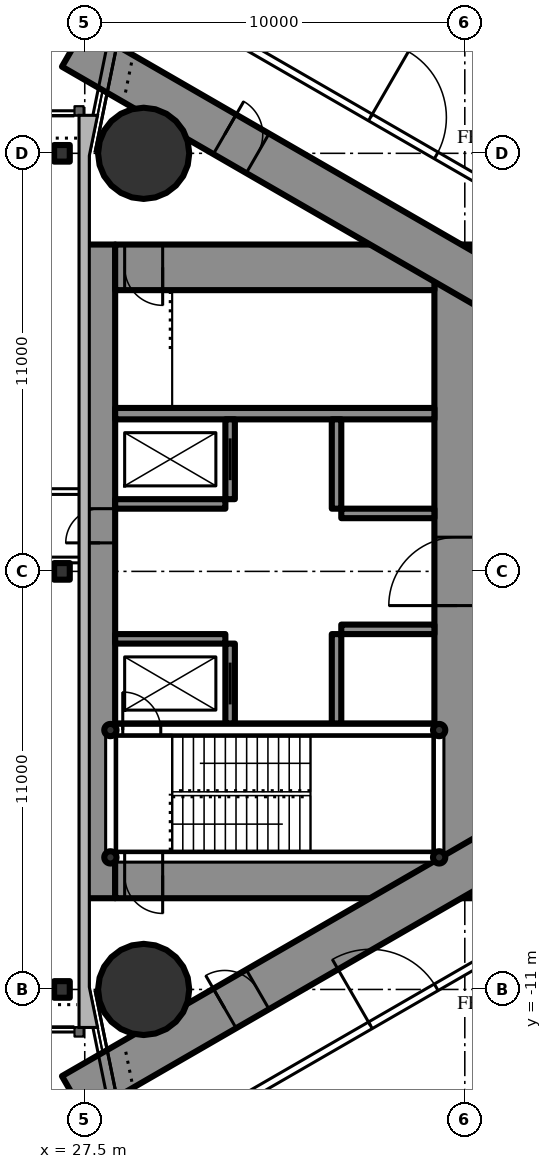
"""IFC4 building model, lengths in metres.
Left out: names, types, materials, properties, quantities, classifications, styles, units other than length and angle.
Written with IfcOpenShell. Run it as: python <this file> out.ifc"""

import sys

from ifc_helpers import new_model, si_unit, direction, frame, frame_2d, origin, origin_2d, place, context, subcontext, project, spatial, rectangle, circle, hollow_circle, i_section, extrude, element, fill, save


model = new_model("IFC4")
c1 = context("Model", 3, precision=1e-05, world=origin(), true_north=direction((0.0, 1.0)))
c2 = subcontext(c1, "Body", "Model", "MODEL_VIEW")
j1 = project(units=[si_unit("LENGTHUNIT", "METRE"), si_unit("PLANEANGLEUNIT", "RADIAN")], contexts=[c1])
p1 = place(None, origin())
s1 = spatial("IfcSite", under=j1, at=p1, CompositionType="ELEMENT")
p2 = place(p1, origin())
s2 = spatial("IfcBuilding", under=s1, at=p2, CompositionType="ELEMENT")
p3 = place(p2, frame((0.0, 0.0, 268.3)))
s3 = spatial("IfcBuildingStorey", under=s2, at=p3, CompositionType="ELEMENT", Elevation=268.3)
for number, where, z_axis, x_axis in (
    (1, (29.05, 11.0, 0.0), (0.0, 0.0, 1.0), (1.0, 0.0, 0.0)),
    (2, (29.05, -11.0, 0.0), (0.0, 0.0, 1.0), (1.0, 0.0, 0.0)),
):
    element("IfcColumn", number, at=place(p3, frame(where, z_axis=z_axis, x_axis=x_axis)), inside=s3, PredefinedType="COLUMN", context=c2, shape_type="SweptSolid", body=[
        extrude(circle(Radius=1.2, at=origin_2d()), origin(), (0.0, 0.0, 1.0), 5.0),
    ])
p4 = place(p3, frame((27.9, -8.6, 0.0), z_axis=(0.0, 0.0, 1.0), x_axis=(0.0, 1.0, 0.0)))
e3 = element("IfcWall", 3, at=p4, inside=s3, PredefinedType="SHEAR", context=c2, shape_type="SweptSolid", body=[
    extrude(rectangle(XDim=17.2, YDim=0.8, at=frame_2d((8.6, 0.0))), origin(), (0.0, 0.0, 1.0), 5.0),
])
p5 = place(p4, frame((9.35, 0.0, 0.0)))
e4 = element("IfcOpeningElement", 4, at=p5, cuts=e3, PredefinedType="OPENING", context=c2, shape_type="SweptSolid", body=[
    extrude(rectangle(XDim=0.9, YDim=2.2, at=frame_2d((0.45, 1.1))), frame((0.0, 0.41, 0.0), z_axis=(0.0, -1.0, 0.0), x_axis=(1.0, 0.0, 0.0)), (0.0, 0.0, 1.0), 0.82),
])
p6 = place(p3, frame((37.3, -8.6, 0.0), z_axis=(0.0, 0.0, 1.0), x_axis=(0.0, 1.0, 0.0)))
e5 = element("IfcWall", 5, at=p6, inside=s3, PredefinedType="SHEAR", context=c2, shape_type="SweptSolid", body=[
    extrude(rectangle(XDim=17.2, YDim=1.2, at=frame_2d((8.6, 0.0))), origin(), (0.0, 0.0, 1.0), 5.0),
])
p7 = place(p6, frame((7.7, 0.0, 0.0)))
e6 = element("IfcOpeningElement", 6, at=p7, cuts=e5, PredefinedType="OPENING", context=c2, shape_type="SweptSolid", body=[
    extrude(rectangle(XDim=1.8, YDim=2.2, at=frame_2d((0.9, 1.1))), frame((0.0, 0.61, 0.0), z_axis=(0.0, -1.0, 0.0), x_axis=(1.0, 0.0, 0.0)), (0.0, 0.0, 1.0), 1.22),
])
p8 = place(p3, frame((28.3, -8.0, 0.0), z_axis=(0.0, 0.0, 1.0), x_axis=(1.0, 0.0, 0.0)))
e7 = element("IfcWall", 7, at=p8, inside=s3, PredefinedType="SHEAR", context=c2, shape_type="SweptSolid", body=[
    extrude(rectangle(XDim=8.4, YDim=1.2, at=frame_2d((4.2, 0.0))), origin(), (0.0, 0.0, 1.0), 5.0),
])
p9 = place(p8, frame((0.25, 0.0, 0.0)))
e8 = element("IfcOpeningElement", 8, at=p9, cuts=e7, PredefinedType="OPENING", context=c2, shape_type="SweptSolid", body=[
    extrude(rectangle(XDim=1.0, YDim=2.2, at=frame_2d((0.5, 1.1))), frame((0.0, 0.61, 0.0), z_axis=(0.0, -1.0, 0.0), x_axis=(1.0, 0.0, 0.0)), (0.0, 0.0, 1.0), 1.22),
])
p10 = place(p3, frame((28.3, 8.0, 0.0), z_axis=(0.0, 0.0, 1.0), x_axis=(1.0, 0.0, 0.0)))
e9 = element("IfcWall", 9, at=p10, inside=s3, PredefinedType="SHEAR", context=c2, shape_type="SweptSolid", body=[
    extrude(rectangle(XDim=8.4, YDim=1.2, at=frame_2d((4.2, 0.0))), origin(), (0.0, 0.0, 1.0), 5.0),
])
p11 = place(p10, frame((0.25, 0.0, 0.0)))
e10 = element("IfcOpeningElement", 10, at=p11, cuts=e9, PredefinedType="OPENING", context=c2, shape_type="SweptSolid", body=[
    extrude(rectangle(XDim=1.0, YDim=2.2, at=frame_2d((0.5, 1.1))), frame((0.0, 0.61, 0.0), z_axis=(0.0, -1.0, 0.0), x_axis=(1.0, 0.0, 0.0)), (0.0, 0.0, 1.0), 1.22),
])
for number, where, z_axis, x_axis in (
    (11, (28.3, -4.15, 0.0), (0.0, 0.0, 1.0), (1.0, 0.0, 0.0)),
    (12, (28.3, 4.15, 0.0), (0.0, 0.0, 1.0), (1.0, 0.0, 0.0)),
):
    element("IfcWall", number, at=place(p3, frame(where, z_axis=z_axis, x_axis=x_axis)), inside=s3, PredefinedType="SHEAR", context=c2, shape_type="SweptSolid", body=[
        extrude(rectangle(XDim=8.4, YDim=0.3, at=frame_2d((4.2, 0.0))), origin(), (0.0, 0.0, 1.0), 5.0),
    ])
p12 = place(p3, frame((31.325, -4.0, 0.0), z_axis=(0.0, 0.0, 1.0), x_axis=(0.0, 1.0, 0.0)))
e13 = element("IfcWall", 13, at=p12, inside=s3, PredefinedType="SHEAR", context=c2, shape_type="SweptSolid", body=[
    extrude(rectangle(XDim=2.1, YDim=0.25, at=frame_2d((1.05, 0.0))), origin(), (0.0, 0.0, 1.0), 5.0),
])
p13 = place(p12, frame((0.5, 0.0, 0.0)))
e14 = element("IfcOpeningElement", 14, at=p13, cuts=e13, PredefinedType="OPENING", context=c2, shape_type="SweptSolid", body=[
    extrude(rectangle(XDim=1.1, YDim=2.2, at=frame_2d((0.55, 1.1))), frame((0.0, 0.135, 0.0), z_axis=(0.0, -1.0, 0.0), x_axis=(1.0, 0.0, 0.0)), (0.0, 0.0, 1.0), 0.27),
])
p14 = place(p3, frame((34.125, -4.0, 0.0), z_axis=(0.0, 0.0, 1.0), x_axis=(0.0, 1.0, 0.0)))
e15 = element("IfcWall", 15, at=p14, inside=s3, PredefinedType="SHEAR", context=c2, shape_type="SweptSolid", body=[
    extrude(rectangle(XDim=2.35, YDim=0.25, at=frame_2d((1.175, 0.0))), origin(), (0.0, 0.0, 1.0), 5.0),
])
p15 = place(p3, frame((28.3, -1.775, 0.0), z_axis=(0.0, 0.0, 1.0), x_axis=(1.0, 0.0, 0.0)))
e16 = element("IfcWall", 16, at=p15, inside=s3, PredefinedType="SHEAR", context=c2, shape_type="SweptSolid", body=[
    extrude(rectangle(XDim=2.9, YDim=0.25, at=frame_2d((1.45, 0.0))), origin(), (0.0, 0.0, 1.0), 5.0),
])
p16 = place(p3, frame((34.25, -1.525, 0.0), z_axis=(0.0, 0.0, 1.0), x_axis=(1.0, 0.0, 0.0)))
e17 = element("IfcWall", 17, at=p16, inside=s3, PredefinedType="SHEAR", context=c2, shape_type="SweptSolid", body=[
    extrude(rectangle(XDim=2.45, YDim=0.25, at=frame_2d((1.225, 0.0))), origin(), (0.0, 0.0, 1.0), 5.0),
])
p17 = place(p3, frame((31.325, 1.9, 0.0), z_axis=(0.0, 0.0, 1.0), x_axis=(0.0, 1.0, 0.0)))
e18 = element("IfcWall", 18, at=p17, inside=s3, PredefinedType="SHEAR", context=c2, shape_type="SweptSolid", body=[
    extrude(rectangle(XDim=2.1, YDim=0.25, at=frame_2d((1.05, 0.0))), origin(), (0.0, 0.0, 1.0), 5.0),
])
p18 = place(p17, frame((0.5, 0.0, 0.0)))
e19 = element("IfcOpeningElement", 19, at=p18, cuts=e18, PredefinedType="OPENING", context=c2, shape_type="SweptSolid", body=[
    extrude(rectangle(XDim=1.1, YDim=2.2, at=frame_2d((0.55, 1.1))), frame((0.0, 0.135, 0.0), z_axis=(0.0, -1.0, 0.0), x_axis=(1.0, 0.0, 0.0)), (0.0, 0.0, 1.0), 0.27),
])
p19 = place(p3, frame((34.125, 1.65, 0.0), z_axis=(0.0, 0.0, 1.0), x_axis=(0.0, 1.0, 0.0)))
e20 = element("IfcWall", 20, at=p19, inside=s3, PredefinedType="SHEAR", context=c2, shape_type="SweptSolid", body=[
    extrude(rectangle(XDim=2.35, YDim=0.25, at=frame_2d((1.175, 0.0))), origin(), (0.0, 0.0, 1.0), 5.0),
])
p20 = place(p3, frame((28.3, 1.775, 0.0), z_axis=(0.0, 0.0, 1.0), x_axis=(1.0, 0.0, 0.0)))
e21 = element("IfcWall", 21, at=p20, inside=s3, PredefinedType="SHEAR", context=c2, shape_type="SweptSolid", body=[
    extrude(rectangle(XDim=2.9, YDim=0.25, at=frame_2d((1.45, 0.0))), origin(), (0.0, 0.0, 1.0), 5.0),
])
p21 = place(p3, frame((34.25, 1.525, 0.0), z_axis=(0.0, 0.0, 1.0), x_axis=(1.0, 0.0, 0.0)))
e22 = element("IfcWall", 22, at=p21, inside=s3, PredefinedType="SHEAR", context=c2, shape_type="SweptSolid", body=[
    extrude(rectangle(XDim=2.45, YDim=0.25, at=frame_2d((1.225, 0.0))), origin(), (0.0, 0.0, 1.0), 5.0),
])
p22 = place(p3, frame((27.2, -13.8, 0.0), z_axis=(0.0, 0.0, 1.0), x_axis=(0.866027159892, 0.499996958321, 0.0)))
e23 = element("IfcWall", 23, at=p22, inside=s3, PredefinedType="SHEAR", context=c2, shape_type="SweptSolid", body=[
    extrude(rectangle(XDim=27.947, YDim=1.2, at=frame_2d((13.973, 0.0))), origin(), (0.0, 0.0, 1.0), 5.0),
])
p23 = place(p22, frame((4.6, 0.0, 0.0)))
e24 = element("IfcOpeningElement", 24, at=p23, cuts=e23, PredefinedType="OPENING", context=c2, shape_type="SweptSolid", body=[
    extrude(rectangle(XDim=1.0, YDim=2.2, at=frame_2d((0.5, 1.1))), frame((0.0, 0.61, 0.0), z_axis=(0.0, -1.0, 0.0), x_axis=(1.0, 0.0, 0.0)), (0.0, 0.0, 1.0), 1.22),
])
p24 = place(p22, frame((13.395, 0.0, 0.0)))
e25 = element("IfcOpeningElement", 25, at=p24, cuts=e23, PredefinedType="OPENING", context=c2, shape_type="SweptSolid", body=[
    extrude(rectangle(XDim=1.8, YDim=2.2, at=frame_2d((0.9, 1.1))), frame((0.0, 0.61, 0.0), z_axis=(0.0, -1.0, 0.0), x_axis=(1.0, 0.0, 0.0)), (0.0, 0.0, 1.0), 1.22),
])
p25 = place(p3, frame((27.2, 13.8, 0.0), z_axis=(0.0, 0.0, 1.0), x_axis=(0.866024515034, -0.500001539357, 0.0)))
e26 = element("IfcWall", 26, at=p25, inside=s3, PredefinedType="SHEAR", context=c2, shape_type="SweptSolid", body=[
    extrude(rectangle(XDim=26.907, YDim=1.2, at=frame_2d((13.454, 0.0))), origin(), (0.0, 0.0, 1.0), 5.0),
])
p26 = place(p25, frame((4.6, 0.0, 0.0)))
e27 = element("IfcOpeningElement", 27, at=p26, cuts=e26, PredefinedType="OPENING", context=c2, shape_type="SweptSolid", body=[
    extrude(rectangle(XDim=1.0, YDim=2.2, at=frame_2d((0.5, 1.1))), frame((0.0, 0.61, 0.0), z_axis=(0.0, -1.0, 0.0), x_axis=(1.0, 0.0, 0.0)), (0.0, 0.0, 1.0), 1.22),
])
p27 = place(p25, frame((13.395, 0.0, 0.0)))
e28 = element("IfcOpeningElement", 28, at=p27, cuts=e26, PredefinedType="OPENING", context=c2, shape_type="SweptSolid", body=[
    extrude(rectangle(XDim=1.8, YDim=2.2, at=frame_2d((0.9, 1.1))), frame((0.0, 0.61, 0.0), z_axis=(0.0, -1.0, 0.0), x_axis=(1.0, 0.0, 0.0)), (0.0, 0.0, 1.0), 1.22),
])
for number, where, z_axis, x_axis in (
    (29, (26.9, -11.0, 0.0), (0.0, 0.0, 1.0), (1.0, 0.0, 0.0)),
    (30, (26.9, 0.0, 0.0), (0.0, 0.0, 1.0), (1.0, 0.0, 0.0)),
    (31, (26.9, 11.0, 0.0), (0.0, 0.0, 1.0), (1.0, 0.0, 0.0)),
):
    element("IfcColumn", number, at=place(p3, frame(where, z_axis=z_axis, x_axis=x_axis)), inside=s3, PredefinedType="COLUMN", context=c2, shape_type="SweptSolid", body=[
        extrude(i_section(OverallWidth=0.412, OverallDepth=0.437, WebThickness=0.036, FlangeThickness=0.058, FilletRadius=0.015, at=origin_2d()), origin(), (0.0, 0.0, 1.0), 5.0),
    ])
for number, where, z_axis, x_axis in (
    (32, (28.175, -7.525, 5.0), (0.0, 0.0, 1.0), (1.0, 0.0, 0.0)),
    (33, (36.825, -7.525, 5.0), (0.0, 0.0, 1.0), (1.0, 0.0, 0.0)),
    (34, (28.175, -4.175, 5.0), (0.0, 0.0, 1.0), (1.0, 0.0, 0.0)),
    (35, (36.825, -4.175, 5.0), (0.0, 0.0, 1.0), (1.0, 0.0, 0.0)),
):
    element("IfcColumn", number, at=place(p3, frame(where, z_axis=z_axis, x_axis=x_axis)), inside=s3, PredefinedType="COLUMN", context=c2, shape_type="SweptSolid", body=[
        extrude(hollow_circle(Radius=0.162, WallThickness=0.012, at=origin_2d()), origin(), (0.0, 0.0, 1.0), 3.0),
    ])
for number, where, z_axis, x_axis in (
    (36, (28.175, -7.422, 5.0), (0.0, 0.0, 1.0), (0.0, 1.0, 0.0)),
    (37, (36.825, -7.422, 5.0), (0.0, 0.0, 1.0), (0.0, 1.0, 0.0)),
):
    element("IfcWall", number, at=place(p3, frame(where, z_axis=z_axis, x_axis=x_axis)), inside=s3, PredefinedType="SOLIDWALL", context=c2, shape_type="SweptSolid", body=[
        extrude(rectangle(XDim=3.144, YDim=0.25, at=frame_2d((1.572, 0.0))), origin(), (0.0, 0.0, 1.0), 2.54),
    ])
p28 = place(p3, frame((28.278, -7.525, 5.0), z_axis=(0.0, 0.0, 1.0), x_axis=(1.0, 0.0, 0.0)))
e38 = element("IfcWall", 38, at=p28, inside=s3, PredefinedType="SOLIDWALL", context=c2, shape_type="SweptSolid", body=[
    extrude(rectangle(XDim=8.444, YDim=0.25, at=frame_2d((4.222, 0.0))), origin(), (0.0, 0.0, 1.0), 2.54),
])
p29 = place(p3, frame((28.278, -4.175, 5.0), z_axis=(0.0, 0.0, 1.0), x_axis=(1.0, 0.0, 0.0)))
e39 = element("IfcWall", 39, at=p29, inside=s3, PredefinedType="SOLIDWALL", context=c2, shape_type="SweptSolid", body=[
    extrude(rectangle(XDim=8.444, YDim=0.25, at=frame_2d((4.222, 0.0))), origin(), (0.0, 0.0, 1.0), 2.54),
])
p30 = place(p29, frame((0.222, 0.0, 0.0)))
e40 = element("IfcOpeningElement", 40, at=p30, cuts=e39, PredefinedType="OPENING", context=c2, shape_type="SweptSolid", body=[
    extrude(rectangle(XDim=1.0, YDim=2.2, at=frame_2d((0.5, 1.1))), frame((0.0, 0.135, 0.0), z_axis=(0.0, -1.0, 0.0), x_axis=(1.0, 0.0, 0.0)), (0.0, 0.0, 1.0), 0.27),
])
p31 = place(p3, frame((28.959, -15.44, 0.0), z_axis=(0.0, 0.0, 1.0), x_axis=(0.866025227435, 0.500000305447, 0.0)))
e41 = element("IfcWall", 41, at=p31, inside=s3, PredefinedType="PARTITIONING", context=c2, shape_type="SweptSolid", body=[
    extrude(rectangle(XDim=30.88, YDim=0.2, at=frame_2d((15.44, 0.0))), origin(), (0.0, 0.0, 1.0), 4.7),
])
p32 = place(p31, frame((6.994, 0.0, 0.0)))
e42 = element("IfcOpeningElement", 42, at=p32, cuts=e41, PredefinedType="OPENING", context=c2, shape_type="SweptSolid", body=[
    extrude(rectangle(XDim=2.0, YDim=2.4, at=frame_2d((1.0, 1.2))), frame((0.0, 0.11, 0.0), z_axis=(0.0, -1.0, 0.0), x_axis=(1.0, 0.0, 0.0)), (0.0, 0.0, 1.0), 0.22),
])
p33 = place(p31, frame((16.704, 0.0, 0.0)))
e43 = element("IfcOpeningElement", 43, at=p33, cuts=e41, PredefinedType="OPENING", context=c2, shape_type="SweptSolid", body=[
    extrude(rectangle(XDim=2.0, YDim=2.4, at=frame_2d((1.0, 1.2))), frame((0.0, 0.11, 0.0), z_axis=(0.0, -1.0, 0.0), x_axis=(1.0, 0.0, 0.0)), (0.0, 0.0, 1.0), 0.22),
])
p34 = place(p31, frame((20.587, 0.0, 0.0)))
e44 = element("IfcOpeningElement", 44, at=p34, cuts=e41, PredefinedType="OPENING", context=c2, shape_type="SweptSolid", body=[
    extrude(rectangle(XDim=2.0, YDim=2.4, at=frame_2d((1.0, 1.2))), frame((0.0, 0.11, 0.0), z_axis=(0.0, -1.0, 0.0), x_axis=(1.0, 0.0, 0.0)), (0.0, 0.0, 1.0), 0.22),
])
p35 = place(p31, frame((26.092, 0.0, 0.0)))
e45 = element("IfcOpeningElement", 45, at=p35, cuts=e41, PredefinedType="OPENING", context=c2, shape_type="SweptSolid", body=[
    extrude(rectangle(XDim=2.0, YDim=2.4, at=frame_2d((1.0, 1.2))), frame((0.0, 0.11, 0.0), z_axis=(0.0, -1.0, 0.0), x_axis=(1.0, 0.0, 0.0)), (0.0, 0.0, 1.0), 0.22),
])
p36 = place(p3, frame((28.959, 15.44, 0.0), z_axis=(0.0, 0.0, 1.0), x_axis=(0.866027378611, -0.499996579484, 0.0)))
e46 = element("IfcWall", 46, at=p36, inside=s3, PredefinedType="PARTITIONING", context=c2, shape_type="SweptSolid", body=[
    extrude(rectangle(XDim=30.76, YDim=0.2, at=frame_2d((15.38, 0.0))), origin(), (0.0, 0.0, 1.0), 4.7),
])
p37 = place(p36, frame((26.032, 0.0, 0.0)))
e47 = element("IfcOpeningElement", 47, at=p37, cuts=e46, PredefinedType="OPENING", context=c2, shape_type="SweptSolid", body=[
    extrude(rectangle(XDim=2.0, YDim=2.4, at=frame_2d((1.0, 1.2))), frame((0.0, 0.11, 0.0), z_axis=(0.0, -1.0, 0.0), x_axis=(1.0, 0.0, 0.0)), (0.0, 0.0, 1.0), 0.22),
])
p38 = place(p36, frame((20.587, 0.0, 0.0)))
e48 = element("IfcOpeningElement", 48, at=p38, cuts=e46, PredefinedType="OPENING", context=c2, shape_type="SweptSolid", body=[
    extrude(rectangle(XDim=2.0, YDim=2.4, at=frame_2d((1.0, 1.2))), frame((0.0, 0.11, 0.0), z_axis=(0.0, -1.0, 0.0), x_axis=(1.0, 0.0, 0.0)), (0.0, 0.0, 1.0), 0.22),
])
p39 = place(p36, frame((16.704, 0.0, 0.0)))
e49 = element("IfcOpeningElement", 49, at=p39, cuts=e46, PredefinedType="OPENING", context=c2, shape_type="SweptSolid", body=[
    extrude(rectangle(XDim=2.0, YDim=2.4, at=frame_2d((1.0, 1.2))), frame((0.0, 0.11, 0.0), z_axis=(0.0, -1.0, 0.0), x_axis=(1.0, 0.0, 0.0)), (0.0, 0.0, 1.0), 0.22),
])
p40 = place(p36, frame((6.994, 0.0, 0.0)))
e50 = element("IfcOpeningElement", 50, at=p40, cuts=e46, PredefinedType="OPENING", context=c2, shape_type="SweptSolid", body=[
    extrude(rectangle(XDim=2.0, YDim=2.4, at=frame_2d((1.0, 1.2))), frame((0.0, 0.11, 0.0), z_axis=(0.0, -1.0, 0.0), x_axis=(1.0, 0.0, 0.0)), (0.0, 0.0, 1.0), 0.22),
])
p41 = place(p3, frame((-27.5, 0.3, 0.0), z_axis=(0.0, 0.0, 1.0), x_axis=(1.0, 0.0, 0.0)))
e51 = element("IfcWall", 51, at=p41, inside=s3, PredefinedType="PARTITIONING", context=c2, shape_type="SweptSolid", body=[
    extrude(rectangle(XDim=55.0, YDim=0.15, at=frame_2d((27.5, 0.0))), origin(), (0.0, 0.0, 1.0), 4.163),
])
p42 = place(p41, frame((7.25, 0.0, 0.0)))
e52 = element("IfcOpeningElement", 52, at=p42, cuts=e51, PredefinedType="OPENING", context=c2, shape_type="SweptSolid", body=[
    extrude(rectangle(XDim=2.0, YDim=2.4, at=frame_2d((1.0, 1.2))), frame((0.0, 0.085, 0.0), z_axis=(0.0, -1.0, 0.0), x_axis=(1.0, 0.0, 0.0)), (0.0, 0.0, 1.0), 0.17),
])
p43 = place(p41, frame((29.25, 0.0, 0.0)))
e53 = element("IfcOpeningElement", 53, at=p43, cuts=e51, PredefinedType="OPENING", context=c2, shape_type="SweptSolid", body=[
    extrude(rectangle(XDim=2.0, YDim=2.4, at=frame_2d((1.0, 1.2))), frame((0.0, 0.085, 0.0), z_axis=(0.0, -1.0, 0.0), x_axis=(1.0, 0.0, 0.0)), (0.0, 0.0, 1.0), 0.17),
])
p44 = place(p41, frame((45.75, 0.0, 0.0)))
e54 = element("IfcOpeningElement", 54, at=p44, cuts=e51, PredefinedType="OPENING", context=c2, shape_type="SweptSolid", body=[
    extrude(rectangle(XDim=2.0, YDim=2.4, at=frame_2d((1.0, 1.2))), frame((0.0, 0.085, 0.0), z_axis=(0.0, -1.0, 0.0), x_axis=(1.0, 0.0, 0.0)), (0.0, 0.0, 1.0), 0.17),
])
p45 = place(p3, frame((-27.5, 2.1, 0.0), z_axis=(0.0, 0.0, 1.0), x_axis=(1.0, 0.0, 0.0)))
e55 = element("IfcWall", 55, at=p45, inside=s3, PredefinedType="PARTITIONING", context=c2, shape_type="SweptSolid", body=[
    extrude(rectangle(XDim=55.0, YDim=0.15, at=frame_2d((27.5, 0.0))), origin(), (0.0, 0.0, 1.0), 4.7),
])
p46 = place(p45, frame((7.25, 0.0, 0.0)))
e56 = element("IfcOpeningElement", 56, at=p46, cuts=e55, PredefinedType="OPENING", context=c2, shape_type="SweptSolid", body=[
    extrude(rectangle(XDim=2.0, YDim=2.4, at=frame_2d((1.0, 1.2))), frame((0.0, 0.085, 0.0), z_axis=(0.0, -1.0, 0.0), x_axis=(1.0, 0.0, 0.0)), (0.0, 0.0, 1.0), 0.17),
])
p47 = place(p45, frame((29.25, 0.0, 0.0)))
e57 = element("IfcOpeningElement", 57, at=p47, cuts=e55, PredefinedType="OPENING", context=c2, shape_type="SweptSolid", body=[
    extrude(rectangle(XDim=2.0, YDim=2.4, at=frame_2d((1.0, 1.2))), frame((0.0, 0.085, 0.0), z_axis=(0.0, -1.0, 0.0), x_axis=(1.0, 0.0, 0.0)), (0.0, 0.0, 1.0), 0.17),
])
p48 = place(p45, frame((45.75, 0.0, 0.0)))
e58 = element("IfcOpeningElement", 58, at=p48, cuts=e55, PredefinedType="OPENING", context=c2, shape_type="SweptSolid", body=[
    extrude(rectangle(XDim=2.0, YDim=2.4, at=frame_2d((1.0, 1.2))), frame((0.0, 0.085, 0.0), z_axis=(0.0, -1.0, 0.0), x_axis=(1.0, 0.0, 0.0)), (0.0, 0.0, 1.0), 0.17),
])
p49 = place(p30, origin())
e59 = element("IfcDoor", 59, at=p49, inside=s3, OperationType="SINGLE_SWING_LEFT", PredefinedType="DOOR", context=c2, shape_type="SweptSolid", body=[
    extrude(rectangle(XDim=1.0, YDim=2.2, at=frame_2d((0.5, 1.1))), frame((0.0, 0.025, 0.0), z_axis=(0.0, -1.0, 0.0), x_axis=(1.0, 0.0, 0.0)), (0.0, 0.0, 1.0), 0.05),
])
fill(e40, e59)
p50 = place(p32, origin())
e60 = element("IfcDoor", 60, at=p50, inside=s3, OperationType="DOUBLE_DOOR_SINGLE_SWING", PredefinedType="DOOR", context=c2, shape_type="SweptSolid", body=[
    extrude(rectangle(XDim=2.0, YDim=2.4, at=frame_2d((1.0, 1.2))), frame((0.0, 0.025, 0.0), z_axis=(0.0, -1.0, 0.0), x_axis=(1.0, 0.0, 0.0)), (0.0, 0.0, 1.0), 0.05),
])
fill(e42, e60)
p51 = place(p40, origin())
e61 = element("IfcDoor", 61, at=p51, inside=s3, OperationType="DOUBLE_DOOR_SINGLE_SWING", PredefinedType="DOOR", context=c2, shape_type="SweptSolid", body=[
    extrude(rectangle(XDim=2.0, YDim=2.4, at=frame_2d((1.0, 1.2))), frame((0.0, 0.025, 0.0), z_axis=(0.0, -1.0, 0.0), x_axis=(1.0, 0.0, 0.0)), (0.0, 0.0, 1.0), 0.05),
])
fill(e50, e61)
p52 = place(p23, origin())
e62 = element("IfcDoor", 62, at=p52, inside=s3, OperationType="SINGLE_SWING_LEFT", PredefinedType="DOOR", context=c2, shape_type="SweptSolid", body=[
    extrude(rectangle(XDim=1.0, YDim=2.2, at=frame_2d((0.5, 1.1))), frame((0.0, 0.025, 0.0), z_axis=(0.0, -1.0, 0.0), x_axis=(1.0, 0.0, 0.0)), (0.0, 0.0, 1.0), 0.05),
])
fill(e24, e62)
p53 = place(p26, origin())
e63 = element("IfcDoor", 63, at=p53, inside=s3, OperationType="SINGLE_SWING_LEFT", PredefinedType="DOOR", context=c2, shape_type="SweptSolid", body=[
    extrude(rectangle(XDim=1.0, YDim=2.2, at=frame_2d((0.5, 1.1))), frame((0.0, 0.025, 0.0), z_axis=(0.0, -1.0, 0.0), x_axis=(1.0, 0.0, 0.0)), (0.0, 0.0, 1.0), 0.05),
])
fill(e27, e63)
p54 = place(p7, origin())
e64 = element("IfcDoor", 64, at=p54, inside=s3, OperationType="DOUBLE_DOOR_SINGLE_SWING", PredefinedType="DOOR", context=c2, shape_type="SweptSolid", body=[
    extrude(rectangle(XDim=1.8, YDim=2.2, at=frame_2d((0.9, 1.1))), frame((0.0, 0.025, 0.0), z_axis=(0.0, -1.0, 0.0), x_axis=(1.0, 0.0, 0.0)), (0.0, 0.0, 1.0), 0.05),
])
fill(e6, e64)
p55 = place(p9, origin())
e65 = element("IfcDoor", 65, at=p55, inside=s3, OperationType="SINGLE_SWING_RIGHT", PredefinedType="DOOR", context=c2, shape_type="SweptSolid", body=[
    extrude(rectangle(XDim=1.0, YDim=2.2, at=frame_2d((0.5, 1.1))), frame((0.0, 0.025, 0.0), z_axis=(0.0, -1.0, 0.0), x_axis=(1.0, 0.0, 0.0)), (0.0, 0.0, 1.0), 0.05),
])
fill(e8, e65)
p56 = place(p11, origin())
e66 = element("IfcDoor", 66, at=p56, inside=s3, OperationType="SINGLE_SWING_RIGHT", PredefinedType="DOOR", context=c2, shape_type="SweptSolid", body=[
    extrude(rectangle(XDim=1.0, YDim=2.2, at=frame_2d((0.5, 1.1))), frame((0.0, 0.025, 0.0), z_axis=(0.0, -1.0, 0.0), x_axis=(1.0, 0.0, 0.0)), (0.0, 0.0, 1.0), 0.05),
])
fill(e10, e66)
p57 = place(p5, origin())
e67 = element("IfcDoor", 67, at=p57, inside=s3, OperationType="SINGLE_SWING_LEFT", PredefinedType="DOOR", context=c2, shape_type="SweptSolid", body=[
    extrude(rectangle(XDim=0.9, YDim=2.2, at=frame_2d((0.45, 1.1))), frame((0.0, 0.025, 0.0), z_axis=(0.0, -1.0, 0.0), x_axis=(1.0, 0.0, 0.0)), (0.0, 0.0, 1.0), 0.05),
])
fill(e4, e67)
p58 = place(p13, origin())
e68 = element("IfcDoor", 68, at=p58, inside=s3, OperationType="SLIDING_TO_LEFT", PredefinedType="USERDEFINED", context=c2, shape_type="SweptSolid", body=[
    extrude(rectangle(XDim=1.1, YDim=2.2, at=frame_2d((0.55, 1.1))), frame((0.0, 0.025, 0.0), z_axis=(0.0, -1.0, 0.0), x_axis=(1.0, 0.0, 0.0)), (0.0, 0.0, 1.0), 0.05),
])
fill(e14, e68)
p59 = place(p18, origin())
e69 = element("IfcDoor", 69, at=p59, inside=s3, OperationType="SLIDING_TO_LEFT", PredefinedType="USERDEFINED", context=c2, shape_type="SweptSolid", body=[
    extrude(rectangle(XDim=1.1, YDim=2.2, at=frame_2d((0.55, 1.1))), frame((0.0, 0.025, 0.0), z_axis=(0.0, -1.0, 0.0), x_axis=(1.0, 0.0, 0.0)), (0.0, 0.0, 1.0), 0.05),
])
fill(e19, e69)
save(model, sys.argv[1])
